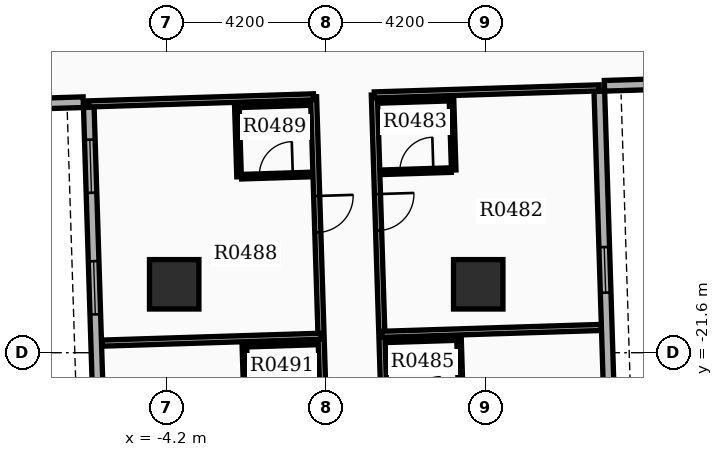
"""IFC4 building model, lengths in metres.
Left out: names, types, materials, properties, quantities, classifications, styles, units other than length and angle.
Written with IfcOpenShell. Run it as: python <this file> out.ifc"""

import sys

from ifc_helpers import new_model, si_unit, direction, frame, frame_2d, origin, origin_2d, place, context, subcontext, project, spatial, rectangle, extrude, element, fill, save


model = new_model("IFC4")
c1 = context("Model", 3, precision=1e-05, world=origin(), true_north=direction((0.0, 1.0)))
c2 = subcontext(c1, "Body", "Model", "MODEL_VIEW")
j1 = project(units=[si_unit("LENGTHUNIT", "METRE"), si_unit("PLANEANGLEUNIT", "RADIAN")], contexts=[c1])
p1 = place(None, origin())
s1 = spatial("IfcSite", under=j1, at=p1, CompositionType="ELEMENT")
p2 = place(p1, origin())
s2 = spatial("IfcBuilding", under=s1, at=p2, CompositionType="ELEMENT")
p3 = place(p2, frame((0.0, 0.0, 31.5)))
s3 = spatial("IfcBuildingStorey", under=s2, at=p3, CompositionType="ELEMENT", Elevation=31.5)
for number, where, z_axis, x_axis in (
    (1, (-4.0, -19.8, 0.0), (0.0, 0.0, 1.0), (1.0, 0.0, 0.0)),
    (2, (4.0, -19.8, 0.0), (0.0, 0.0, 1.0), (1.0, 0.0, 0.0)),
):
    element("IfcColumn", number, at=place(p3, frame(where, z_axis=z_axis, x_axis=x_axis)), inside=s3, PredefinedType="COLUMN", context=c2, shape_type="SweptSolid", body=[
        extrude(rectangle(XDim=1.3, YDim=1.3, at=origin_2d()), origin(), (0.0, 0.0, 1.0), 3.9),
    ])
p4 = place(p3, frame((-6.247, -15.144, 0.0), z_axis=(0.0, 0.0, 1.0), x_axis=(0.031398187845, -0.999506955354, 0.0)))
e3 = element("IfcWall", 3, at=p4, inside=s3, PredefinedType="STANDARD", context=c2, shape_type="SweptSolid", body=[
    extrude(rectangle(XDim=20.1, YDim=0.28, at=frame_2d((10.05, 0.0))), origin(), (0.0, 0.0, 1.0), 2.91),
])
p5 = place(p4, frame((0.85, 0.0, 0.8)))
e4 = element("IfcOpeningElement", 4, at=p5, cuts=e3, PredefinedType="OPENING", context=c2, shape_type="SweptSolid", body=[
    extrude(rectangle(XDim=1.4, YDim=1.6, at=frame_2d((0.7, 0.8))), frame((0.0, 0.15, 0.0), z_axis=(0.0, -1.0, 0.0), x_axis=(1.0, 0.0, 0.0)), (0.0, 0.0, 1.0), 0.3),
])
p6 = place(p4, frame((4.05, 0.0, 0.8)))
e5 = element("IfcOpeningElement", 5, at=p6, cuts=e3, PredefinedType="OPENING", context=c2, shape_type="SweptSolid", body=[
    extrude(rectangle(XDim=1.4, YDim=1.6, at=frame_2d((0.7, 0.8))), frame((0.0, 0.15, 0.0), z_axis=(0.0, -1.0, 0.0), x_axis=(1.0, 0.0, 0.0)), (0.0, 0.0, 1.0), 0.3),
])
p7 = place(p4, frame((7.25, 0.0, 0.8)))
e6 = element("IfcOpeningElement", 6, at=p7, cuts=e3, PredefinedType="OPENING", context=c2, shape_type="SweptSolid", body=[
    extrude(rectangle(XDim=1.4, YDim=1.6, at=frame_2d((0.7, 0.8))), frame((0.0, 0.15, 0.0), z_axis=(0.0, -1.0, 0.0), x_axis=(1.0, 0.0, 0.0)), (0.0, 0.0, 1.0), 0.3),
])
p8 = place(p4, frame((10.45, 0.0, 0.8)))
e7 = element("IfcOpeningElement", 7, at=p8, cuts=e3, PredefinedType="OPENING", context=c2, shape_type="SweptSolid", body=[
    extrude(rectangle(XDim=1.4, YDim=1.6, at=frame_2d((0.7, 0.8))), frame((0.0, 0.15, 0.0), z_axis=(0.0, -1.0, 0.0), x_axis=(1.0, 0.0, 0.0)), (0.0, 0.0, 1.0), 0.3),
])
p9 = place(p3, frame((7.817, -34.812, 0.0), z_axis=(0.0, 0.0, 1.0), x_axis=(-0.031410322165, 0.999506574096, 0.0)))
e8 = element("IfcWall", 8, at=p9, inside=s3, PredefinedType="STANDARD", context=c2, shape_type="SweptSolid", body=[
    extrude(rectangle(XDim=20.1, YDim=0.28, at=frame_2d((10.05, 0.0))), origin(), (0.0, 0.0, 1.0), 2.91),
])
p10 = place(p9, frame((0.85, 0.0, 0.8)))
e9 = element("IfcOpeningElement", 9, at=p10, cuts=e8, PredefinedType="OPENING", context=c2, shape_type="SweptSolid", body=[
    extrude(rectangle(XDim=1.4, YDim=1.6, at=frame_2d((0.7, 0.8))), frame((0.0, 0.15, 0.0), z_axis=(0.0, -1.0, 0.0), x_axis=(1.0, 0.0, 0.0)), (0.0, 0.0, 1.0), 0.3),
])
p11 = place(p9, frame((4.05, 0.0, 0.8)))
e10 = element("IfcOpeningElement", 10, at=p11, cuts=e8, PredefinedType="OPENING", context=c2, shape_type="SweptSolid", body=[
    extrude(rectangle(XDim=1.4, YDim=1.6, at=frame_2d((0.7, 0.8))), frame((0.0, 0.15, 0.0), z_axis=(0.0, -1.0, 0.0), x_axis=(1.0, 0.0, 0.0)), (0.0, 0.0, 1.0), 0.3),
])
p12 = place(p9, frame((7.5, 0.0, 0.8)))
e11 = element("IfcOpeningElement", 11, at=p12, cuts=e8, PredefinedType="OPENING", context=c2, shape_type="SweptSolid", body=[
    extrude(rectangle(XDim=1.4, YDim=1.6, at=frame_2d((0.7, 0.8))), frame((0.0, 0.15, 0.0), z_axis=(0.0, -1.0, 0.0), x_axis=(1.0, 0.0, 0.0)), (0.0, 0.0, 1.0), 0.3),
])
p13 = place(p9, frame((10.7, 0.0, 0.8)))
e12 = element("IfcOpeningElement", 12, at=p13, cuts=e8, PredefinedType="OPENING", context=c2, shape_type="SweptSolid", body=[
    extrude(rectangle(XDim=1.4, YDim=1.6, at=frame_2d((0.7, 0.8))), frame((0.0, 0.15, 0.0), z_axis=(0.0, -1.0, 0.0), x_axis=(1.0, 0.0, 0.0)), (0.0, 0.0, 1.0), 0.3),
])
p14 = place(p9, frame((14.799, 0.0, 0.85)))
e13 = element("IfcOpeningElement", 13, at=p14, cuts=e8, PredefinedType="OPENING", context=c2, shape_type="SweptSolid", body=[
    extrude(rectangle(XDim=1.2, YDim=1.6, at=frame_2d((0.6, 0.8))), frame((0.0, 0.15, 0.0), z_axis=(0.0, -1.0, 0.0), x_axis=(1.0, 0.0, 0.0)), (0.0, 0.0, 1.0), 0.3),
])
p15 = place(p3, frame((-12.689, -15.206, 0.0), z_axis=(0.0, 0.0, 1.0), x_axis=(0.999507262922, 0.031388395416, 0.0)))
e14 = element("IfcWall", 14, at=p15, inside=s3, PredefinedType="STANDARD", context=c2, shape_type="SweptSolid", body=[
    extrude(rectangle(XDim=6.3, YDim=0.28, at=frame_2d((3.15, 0.0))), origin(), (0.0, 0.0, 1.0), 2.91),
])
p16 = place(p3, frame((13.618, -14.379, 0.0), z_axis=(0.0, 0.0, 1.0), x_axis=(-0.999507224741, -0.031389611199, 0.0)))
e15 = element("IfcWall", 15, at=p16, inside=s3, PredefinedType="STANDARD", context=c2, shape_type="SweptSolid", body=[
    extrude(rectangle(XDim=6.3, YDim=0.28, at=frame_2d((3.15, 0.0))), origin(), (0.0, 0.0, 1.0), 2.91),
])
p17 = place(p3, frame((1.266, -14.817, 0.0), z_axis=(0.0, 0.0, 1.0), x_axis=(0.031403565719, -0.9995067864, 0.0)))
e16 = element("IfcWall", 16, at=p17, inside=s3, PredefinedType="PARTITIONING", context=c2, shape_type="SweptSolid", body=[
    extrude(rectangle(XDim=20.182, YDim=0.16, at=frame_2d((10.091, 0.0))), origin(), (0.0, 0.0, 1.0), 2.9),
])
p18 = place(p17, frame((2.61, 0.0, 0.0)))
e17 = element("IfcOpeningElement", 17, at=p18, cuts=e16, PredefinedType="OPENING", context=c2, shape_type="SweptSolid", body=[
    extrude(rectangle(XDim=0.96, YDim=2.15, at=frame_2d((0.48, 1.075))), frame((0.0, 0.09, 0.0), z_axis=(0.0, -1.0, 0.0), x_axis=(1.0, 0.0, 0.0)), (0.0, 0.0, 1.0), 0.18),
])
p19 = place(p17, frame((8.994, 0.0, 0.0)))
e18 = element("IfcOpeningElement", 18, at=p19, cuts=e16, PredefinedType="OPENING", context=c2, shape_type="SweptSolid", body=[
    extrude(rectangle(XDim=0.96, YDim=2.15, at=frame_2d((0.48, 1.075))), frame((0.0, 0.09, 0.0), z_axis=(0.0, -1.0, 0.0), x_axis=(1.0, 0.0, 0.0)), (0.0, 0.0, 1.0), 0.18),
])
p20 = place(p17, frame((18.93, 0.0, 0.0)))
e19 = element("IfcOpeningElement", 19, at=p20, cuts=e16, PredefinedType="OPENING", context=c2, shape_type="SweptSolid", body=[
    extrude(rectangle(XDim=0.96, YDim=2.15, at=frame_2d((0.48, 1.075))), frame((0.0, 0.09, 0.0), z_axis=(0.0, -1.0, 0.0), x_axis=(1.0, 0.0, 0.0)), (0.0, 0.0, 1.0), 0.18),
])
p21 = place(p3, frame((1.266, -14.817, 0.0), z_axis=(0.0, 0.0, 1.0), x_axis=(0.999507397699, 0.031384103385, 0.0)))
e20 = element("IfcWall", 20, at=p21, inside=s3, PredefinedType="PARTITIONING", context=c2, shape_type="SweptSolid", body=[
    extrude(rectangle(XDim=5.92, YDim=0.16, at=frame_2d((2.96, 0.0))), origin(), (0.0, 0.0, 1.0), 2.9),
])
p22 = place(p3, frame((1.464, -21.116, 0.0), z_axis=(0.0, 0.0, 1.0), x_axis=(0.999506032581, 0.031427548972, 0.0)))
e21 = element("IfcWall", 21, at=p22, inside=s3, PredefinedType="PARTITIONING", context=c2, shape_type="SweptSolid", body=[
    extrude(rectangle(XDim=5.772, YDim=0.16, at=frame_2d((2.886, 0.0))), origin(), (0.0, 0.0, 1.0), 2.9),
])
p23 = place(p3, frame((1.47, -16.852, 0.0), z_axis=(0.0, 0.0, 1.0), x_axis=(0.999507221803, 0.031389704724, 0.0)))
e22 = element("IfcWall", 22, at=p23, inside=s3, PredefinedType="PARTITIONING", context=c2, shape_type="SweptSolid", body=[
    extrude(rectangle(XDim=1.82, YDim=0.12, at=frame_2d((0.91, 0.0))), origin(), (0.0, 0.0, 1.0), 2.9),
])
p24 = place(p23, frame((0.47, 0.0, 0.0)))
e23 = element("IfcOpeningElement", 23, at=p24, cuts=e22, PredefinedType="OPENING", context=c2, shape_type="SweptSolid", body=[
    extrude(rectangle(XDim=0.88, YDim=2.1, at=frame_2d((0.44, 1.05))), frame((0.0, 0.07, 0.0), z_axis=(0.0, -1.0, 0.0), x_axis=(1.0, 0.0, 0.0)), (0.0, 0.0, 1.0), 0.14),
])
p25 = place(p3, frame((1.411, -14.973, 0.0), z_axis=(0.0, 0.0, 1.0), x_axis=(0.999507221803, 0.031389704724, 0.0)))
e24 = element("IfcWall", 24, at=p25, inside=s3, PredefinedType="PARTITIONING", context=c2, shape_type="SweptSolid", body=[
    extrude(rectangle(XDim=1.82, YDim=0.12, at=frame_2d((0.91, 0.0))), origin(), (0.0, 0.0, 1.0), 2.9),
])
p26 = place(p3, frame((3.295, -14.914, 0.0), z_axis=(0.0, 0.0, 1.0), x_axis=(0.031295563454, -0.999510173889, 0.0)))
e25 = element("IfcWall", 25, at=p26, inside=s3, PredefinedType="PARTITIONING", context=c2, shape_type="SweptSolid", body=[
    extrude(rectangle(XDim=1.88, YDim=0.12, at=frame_2d((0.94, 0.0))), origin(), (0.0, 0.0, 1.0), 2.9),
])
p27 = place(p3, frame((1.609, -21.272, 0.0), z_axis=(0.0, 0.0, 1.0), x_axis=(0.999507221803, 0.031389704724, 0.0)))
e26 = element("IfcWall", 26, at=p27, inside=s3, PredefinedType="PARTITIONING", context=c2, shape_type="SweptSolid", body=[
    extrude(rectangle(XDim=1.82, YDim=0.12, at=frame_2d((0.91, 0.0))), origin(), (0.0, 0.0, 1.0), 2.9),
])
p28 = place(p3, frame((3.493, -21.213, 0.0), z_axis=(0.0, 0.0, 1.0), x_axis=(0.031425292588, -0.999506103526, 0.0)))
e27 = element("IfcWall", 27, at=p28, inside=s3, PredefinedType="PARTITIONING", context=c2, shape_type="SweptSolid", body=[
    extrude(rectangle(XDim=1.88, YDim=0.12, at=frame_2d((0.94, 0.0))), origin(), (0.0, 0.0, 1.0), 2.9),
])
p29 = place(p3, frame((-0.333, -14.868, 0.0), z_axis=(0.0, 0.0, 1.0), x_axis=(0.031416030536, -0.99950639469, 0.0)))
e28 = element("IfcWall", 28, at=p29, inside=s3, PredefinedType="PARTITIONING", context=c2, shape_type="SweptSolid", body=[
    extrude(rectangle(XDim=20.182, YDim=0.16, at=frame_2d((10.091, 0.0))), origin(), (0.0, 0.0, 1.0), 2.9),
])
p30 = place(p29, frame((2.61, 0.0, 0.0)))
e29 = element("IfcOpeningElement", 29, at=p30, cuts=e28, PredefinedType="OPENING", context=c2, shape_type="SweptSolid", body=[
    extrude(rectangle(XDim=0.96, YDim=2.15, at=frame_2d((0.48, 1.075))), frame((0.0, 0.09, 0.0), z_axis=(0.0, -1.0, 0.0), x_axis=(1.0, 0.0, 0.0)), (0.0, 0.0, 1.0), 0.18),
])
p31 = place(p29, frame((8.994, 0.0, 0.0)))
e30 = element("IfcOpeningElement", 30, at=p31, cuts=e28, PredefinedType="OPENING", context=c2, shape_type="SweptSolid", body=[
    extrude(rectangle(XDim=0.96, YDim=2.15, at=frame_2d((0.48, 1.075))), frame((0.0, 0.09, 0.0), z_axis=(0.0, -1.0, 0.0), x_axis=(1.0, 0.0, 0.0)), (0.0, 0.0, 1.0), 0.18),
])
p32 = place(p29, frame((18.93, 0.0, 0.0)))
e31 = element("IfcOpeningElement", 31, at=p32, cuts=e28, PredefinedType="OPENING", context=c2, shape_type="SweptSolid", body=[
    extrude(rectangle(XDim=0.96, YDim=2.15, at=frame_2d((0.48, 1.075))), frame((0.0, 0.09, 0.0), z_axis=(0.0, -1.0, 0.0), x_axis=(1.0, 0.0, 0.0)), (0.0, 0.0, 1.0), 0.18),
])
p33 = place(p3, frame((-0.333, -14.868, 0.0), z_axis=(0.0, 0.0, 1.0), x_axis=(-0.999507397699, -0.031384103385, 0.0)))
e32 = element("IfcWall", 32, at=p33, inside=s3, PredefinedType="PARTITIONING", context=c2, shape_type="SweptSolid", body=[
    extrude(rectangle(XDim=5.92, YDim=0.16, at=frame_2d((2.96, 0.0))), origin(), (0.0, 0.0, 1.0), 2.9),
])
p34 = place(p3, frame((-0.135, -21.167, 0.0), z_axis=(0.0, 0.0, 1.0), x_axis=(-0.999507360361, -0.031385292484, 0.0)))
e33 = element("IfcWall", 33, at=p34, inside=s3, PredefinedType="PARTITIONING", context=c2, shape_type="SweptSolid", body=[
    extrude(rectangle(XDim=5.772, YDim=0.16, at=frame_2d((2.886, 0.0))), origin(), (0.0, 0.0, 1.0), 2.9),
])
p35 = place(p3, frame((-2.228, -16.969, 0.0), z_axis=(0.0, 0.0, 1.0), x_axis=(0.999503004171, 0.03152371574, 0.0)))
e34 = element("IfcWall", 34, at=p35, inside=s3, PredefinedType="PARTITIONING", context=c2, shape_type="SweptSolid", body=[
    extrude(rectangle(XDim=1.82, YDim=0.12, at=frame_2d((0.91, 0.0))), origin(), (0.0, 0.0, 1.0), 2.9),
])
p36 = place(p35, frame((0.47, 0.0, 0.0)))
e35 = element("IfcOpeningElement", 35, at=p36, cuts=e34, PredefinedType="OPENING", context=c2, shape_type="SweptSolid", body=[
    extrude(rectangle(XDim=0.88, YDim=2.1, at=frame_2d((0.44, 1.05))), frame((0.0, 0.07, 0.0), z_axis=(0.0, -1.0, 0.0), x_axis=(1.0, 0.0, 0.0)), (0.0, 0.0, 1.0), 0.14),
])
p37 = place(p3, frame((-2.287, -15.089, 0.0), z_axis=(0.0, 0.0, 1.0), x_axis=(0.999503004171, 0.03152371574, 0.0)))
e36 = element("IfcWall", 36, at=p37, inside=s3, PredefinedType="PARTITIONING", context=c2, shape_type="SweptSolid", body=[
    extrude(rectangle(XDim=1.82, YDim=0.12, at=frame_2d((0.91, 0.0))), origin(), (0.0, 0.0, 1.0), 2.9),
])
p38 = place(p3, frame((-2.352, -15.091, 0.0), z_axis=(0.0, 0.0, 1.0), x_axis=(0.031295563454, -0.999510173889, 0.0)))
e37 = element("IfcWall", 37, at=p38, inside=s3, PredefinedType="PARTITIONING", context=c2, shape_type="SweptSolid", body=[
    extrude(rectangle(XDim=1.88, YDim=0.12, at=frame_2d((0.94, 0.0))), origin(), (0.0, 0.0, 1.0), 2.9),
])
p39 = place(p3, frame((-2.089, -21.388, 0.0), z_axis=(0.0, 0.0, 1.0), x_axis=(0.999507221803, 0.031389704724, 0.0)))
e38 = element("IfcWall", 38, at=p39, inside=s3, PredefinedType="PARTITIONING", context=c2, shape_type="SweptSolid", body=[
    extrude(rectangle(XDim=1.82, YDim=0.12, at=frame_2d((0.91, 0.0))), origin(), (0.0, 0.0, 1.0), 2.9),
])
p40 = place(p3, frame((-2.154, -21.39, 0.0), z_axis=(0.0, 0.0, 1.0), x_axis=(0.031425292588, -0.999506103526, 0.0)))
e39 = element("IfcWall", 39, at=p40, inside=s3, PredefinedType="PARTITIONING", context=c2, shape_type="SweptSolid", body=[
    extrude(rectangle(XDim=1.88, YDim=0.12, at=frame_2d((0.94, 0.0))), origin(), (0.0, 0.0, 1.0), 2.9),
])
p41 = place(p5, origin())
e40 = element("IfcWindow", 40, at=p41, inside=s3, PartitioningType="SINGLE_PANEL", PredefinedType="WINDOW", context=c2, shape_type="SweptSolid", body=[
    extrude(rectangle(XDim=1.4, YDim=1.6, at=frame_2d((0.7, 0.8))), frame((0.0, 0.03, 0.0), z_axis=(0.0, -1.0, 0.0), x_axis=(1.0, 0.0, 0.0)), (0.0, 0.0, 1.0), 0.06),
])
fill(e4, e40)
p42 = place(p6, origin())
e41 = element("IfcWindow", 41, at=p42, inside=s3, PartitioningType="SINGLE_PANEL", PredefinedType="WINDOW", context=c2, shape_type="SweptSolid", body=[
    extrude(rectangle(XDim=1.4, YDim=1.6, at=frame_2d((0.7, 0.8))), frame((0.0, 0.03, 0.0), z_axis=(0.0, -1.0, 0.0), x_axis=(1.0, 0.0, 0.0)), (0.0, 0.0, 1.0), 0.06),
])
fill(e5, e41)
p43 = place(p14, origin())
e42 = element("IfcWindow", 42, at=p43, inside=s3, PartitioningType="SINGLE_PANEL", PredefinedType="WINDOW", context=c2, shape_type="SweptSolid", body=[
    extrude(rectangle(XDim=1.2, YDim=1.6, at=frame_2d((0.6, 0.8))), frame((0.0, 0.03, 0.0), z_axis=(0.0, -1.0, 0.0), x_axis=(1.0, 0.0, 0.0)), (0.0, 0.0, 1.0), 0.06),
])
fill(e13, e42)
p44 = place(p18, origin())
e43 = element("IfcDoor", 43, at=p44, inside=s3, OperationType="SINGLE_SWING_LEFT", PredefinedType="DOOR", context=c2, shape_type="SweptSolid", body=[
    extrude(rectangle(XDim=0.96, YDim=2.15, at=frame_2d((0.48, 1.075))), frame((0.0, 0.025, 0.0), z_axis=(0.0, -1.0, 0.0), x_axis=(1.0, 0.0, 0.0)), (0.0, 0.0, 1.0), 0.05),
])
fill(e17, e43)
p45 = place(p24, origin())
e44 = element("IfcDoor", 44, at=p45, inside=s3, OperationType="SINGLE_SWING_RIGHT", PredefinedType="DOOR", context=c2, shape_type="SweptSolid", body=[
    extrude(rectangle(XDim=0.88, YDim=2.1, at=frame_2d((0.44, 1.05))), frame((0.0, 0.025, 0.0), z_axis=(0.0, -1.0, 0.0), x_axis=(1.0, 0.0, 0.0)), (0.0, 0.0, 1.0), 0.05),
])
fill(e23, e44)
p46 = place(p30, origin())
e45 = element("IfcDoor", 45, at=p46, inside=s3, OperationType="SINGLE_SWING_LEFT", PredefinedType="DOOR", context=c2, shape_type="SweptSolid", body=[
    extrude(rectangle(XDim=0.96, YDim=2.15, at=frame_2d((0.48, 1.075))), frame((0.0, 0.025, 0.0), z_axis=(0.0, -1.0, 0.0), x_axis=(1.0, 0.0, 0.0)), (0.0, 0.0, 1.0), 0.05),
])
fill(e29, e45)
p47 = place(p36, origin())
e46 = element("IfcDoor", 46, at=p47, inside=s3, OperationType="SINGLE_SWING_RIGHT", PredefinedType="DOOR", context=c2, shape_type="SweptSolid", body=[
    extrude(rectangle(XDim=0.88, YDim=2.1, at=frame_2d((0.44, 1.05))), frame((0.0, 0.025, 0.0), z_axis=(0.0, -1.0, 0.0), x_axis=(1.0, 0.0, 0.0)), (0.0, 0.0, 1.0), 0.05),
])
fill(e35, e46)
save(model, sys.argv[1])
